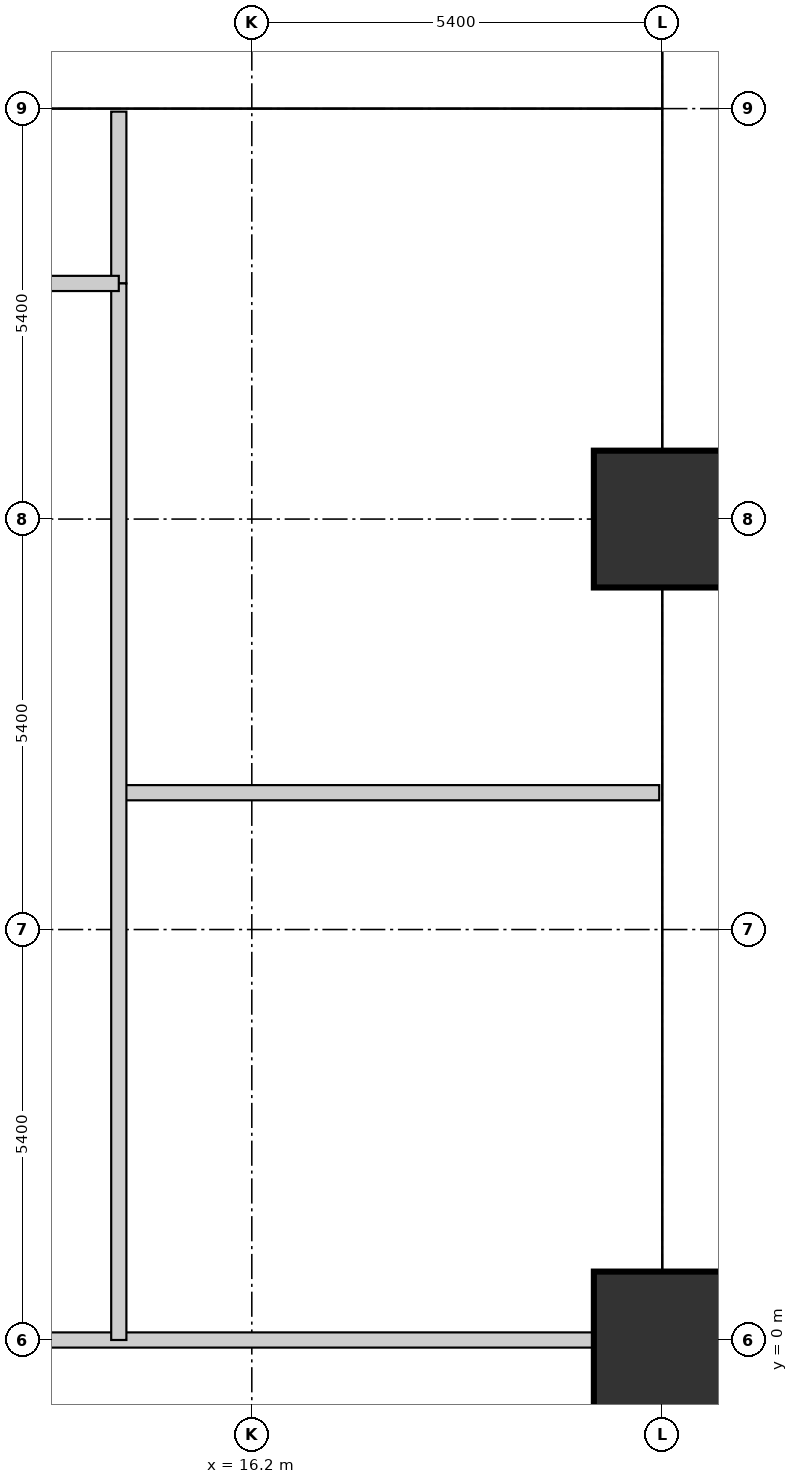
"""IFC4 building model, lengths in metres.
Left out: names, types, materials, properties, quantities, classifications, styles, units other than length and angle.
Written with IfcOpenShell. Run it as: python <this file> out.ifc"""

import sys

from ifc_helpers import new_model, si_unit, direction, frame, frame_2d, origin, origin_2d, place, context, subcontext, project, spatial, rectangle, circle, extrude, element, fill, save


model = new_model("IFC4")
c1 = context("Model", 3, precision=1e-05, world=origin(), true_north=direction((0.0, 1.0)))
c2 = subcontext(c1, "Body", "Model", "MODEL_VIEW")
j1 = project(units=[si_unit("LENGTHUNIT", "METRE"), si_unit("PLANEANGLEUNIT", "RADIAN")], contexts=[c1])
p1 = place(None, origin())
s1 = spatial("IfcSite", under=j1, at=p1, CompositionType="ELEMENT")
p2 = place(p1, origin())
s2 = spatial("IfcBuilding", under=s1, at=p2, CompositionType="ELEMENT")
p3 = place(p2, origin())
s3 = spatial("IfcBuildingStorey", under=s2, at=p3, CompositionType="ELEMENT", Elevation=0.0)
for number, where, z_axis, x_axis in (
    (1, (21.6, 0.0, 0.0), (0.0, 0.0, 1.0), (1.0, 0.0, 0.0)),
    (2, (21.6, 10.8, 0.0), (0.0, 0.0, 1.0), (1.0, 0.0, 0.0)),
):
    element("IfcColumn", number, at=place(p3, frame(where, z_axis=z_axis, x_axis=x_axis)), inside=s3, PredefinedType="COLUMN", context=c2, shape_type="SweptSolid", body=[
        extrude(circle(Radius=0.9, at=origin_2d()), origin(), (0.0, 0.0, 1.0), 4.5),
    ])
p4 = place(p3, frame((14.45, 7.2, 0.0), z_axis=(0.0, 0.0, 1.0), x_axis=(1.0, 0.0, 0.0)))
e3 = element("IfcWall", 3, at=p4, inside=s3, PredefinedType="PARTITIONING", context=c2, shape_type="SweptSolid", body=[
    extrude(rectangle(XDim=7.11, YDim=0.2, at=frame_2d((3.555, 0.0))), origin(), (0.0, 0.0, 1.0), 3.329),
])
p5 = place(p3, frame((10.85, 0.0, 0.0), z_axis=(0.0, 0.0, 1.0), x_axis=(1.0, 0.0, 0.0)))
e4 = element("IfcWall", 4, at=p5, inside=s3, PredefinedType="PARTITIONING", context=c2, shape_type="SweptSolid", body=[
    extrude(rectangle(XDim=10.71, YDim=0.2, at=frame_2d((5.355, 0.0))), origin(), (0.0, 0.0, 1.0), 2.205),
])
p6 = place(p5, frame((2.25, 0.0, 0.0)))
e5 = element("IfcOpeningElement", 5, at=p6, cuts=e4, PredefinedType="OPENING", context=c2, shape_type="SweptSolid", body=[
    extrude(rectangle(XDim=1.1, YDim=2.1, at=frame_2d((0.55, 1.05))), frame((0.0, 0.11, 0.0), z_axis=(0.0, -1.0, 0.0), x_axis=(1.0, 0.0, 0.0)), (0.0, 0.0, 1.0), 0.22),
])
p7 = place(p3, frame((14.45, 13.9, 0.0), z_axis=(0.0, 0.0, 1.0), x_axis=(0.0, 1.0, 0.0)))
e6 = element("IfcWall", 6, at=p7, inside=s3, PredefinedType="PARTITIONING", context=c2, shape_type="SweptSolid", body=[
    extrude(rectangle(XDim=2.26, YDim=0.2, at=frame_2d((1.13, 0.0))), origin(), (0.0, 0.0, 1.0), 4.2),
])
p8 = place(p3, frame((14.45, 0.0, 0.0), z_axis=(0.0, 0.0, 1.0), x_axis=(0.0, 1.0, 0.0)))
e7 = element("IfcWall", 7, at=p8, inside=s3, PredefinedType="PARTITIONING", context=c2, shape_type="SweptSolid", body=[
    extrude(rectangle(XDim=13.9, YDim=0.2, at=frame_2d((6.95, 0.0))), origin(), (0.0, 0.0, 1.0), 3.329),
])
p9 = place(p8, frame((2.5, 0.0, 0.0)))
e8 = element("IfcOpeningElement", 8, at=p9, cuts=e7, PredefinedType="OPENING", context=c2, shape_type="SweptSolid", body=[
    extrude(rectangle(XDim=1.1, YDim=2.1, at=frame_2d((0.55, 1.05))), frame((0.0, 0.11, 0.0), z_axis=(0.0, -1.0, 0.0), x_axis=(1.0, 0.0, 0.0)), (0.0, 0.0, 1.0), 0.22),
])
p10 = place(p8, frame((9.5, 0.0, 0.0)))
e9 = element("IfcOpeningElement", 9, at=p10, cuts=e7, PredefinedType="OPENING", context=c2, shape_type="SweptSolid", body=[
    extrude(rectangle(XDim=1.1, YDim=2.1, at=frame_2d((0.55, 1.05))), frame((0.0, 0.11, 0.0), z_axis=(0.0, -1.0, 0.0), x_axis=(1.0, 0.0, 0.0)), (0.0, 0.0, 1.0), 0.22),
])
p11 = place(p3, frame((-13.15, 13.9, 0.0), z_axis=(0.0, 0.0, 1.0), x_axis=(1.0, 0.0, 0.0)))
e10 = element("IfcWall", 10, at=p11, inside=s3, PredefinedType="PARTITIONING", context=c2, shape_type="SweptSolid", body=[
    extrude(rectangle(XDim=27.6, YDim=0.2, at=frame_2d((13.8, 0.0))), origin(), (0.0, 0.0, 1.0), 3.329),
])
p12 = place(p11, frame((3.2, 0.0, 0.0)))
e11 = element("IfcOpeningElement", 11, at=p12, cuts=e10, PredefinedType="OPENING", context=c2, shape_type="SweptSolid", body=[
    extrude(rectangle(XDim=0.85, YDim=2.1, at=frame_2d((0.425, 1.05))), frame((0.0, 0.11, 0.0), z_axis=(0.0, -1.0, 0.0), x_axis=(1.0, 0.0, 0.0)), (0.0, 0.0, 1.0), 0.22),
])
p13 = place(p11, frame((14.0, 0.0, 0.0)))
e12 = element("IfcOpeningElement", 12, at=p13, cuts=e10, PredefinedType="OPENING", context=c2, shape_type="SweptSolid", body=[
    extrude(rectangle(XDim=1.1, YDim=2.1, at=frame_2d((0.55, 1.05))), frame((0.0, 0.11, 0.0), z_axis=(0.0, -1.0, 0.0), x_axis=(1.0, 0.0, 0.0)), (0.0, 0.0, 1.0), 0.22),
])
p14 = place(p6, origin())
e13 = element("IfcDoor", 13, at=p14, inside=s3, OperationType="SINGLE_SWING_RIGHT", PredefinedType="DOOR", context=c2, shape_type="SweptSolid", body=[
    extrude(rectangle(XDim=1.1, YDim=2.1, at=frame_2d((0.55, 1.05))), frame((0.0, 0.025, 0.0), z_axis=(0.0, -1.0, 0.0), x_axis=(1.0, 0.0, 0.0)), (0.0, 0.0, 1.0), 0.05),
])
fill(e5, e13)
p15 = place(p9, origin())
e14 = element("IfcDoor", 14, at=p15, inside=s3, OperationType="SINGLE_SWING_RIGHT", PredefinedType="DOOR", context=c2, shape_type="SweptSolid", body=[
    extrude(rectangle(XDim=1.1, YDim=2.1, at=frame_2d((0.55, 1.05))), frame((0.0, 0.025, 0.0), z_axis=(0.0, -1.0, 0.0), x_axis=(1.0, 0.0, 0.0)), (0.0, 0.0, 1.0), 0.05),
])
fill(e8, e14)
p16 = place(p10, origin())
e15 = element("IfcDoor", 15, at=p16, inside=s3, OperationType="SINGLE_SWING_LEFT", PredefinedType="DOOR", context=c2, shape_type="SweptSolid", body=[
    extrude(rectangle(XDim=1.1, YDim=2.1, at=frame_2d((0.55, 1.05))), frame((0.0, 0.025, 0.0), z_axis=(0.0, -1.0, 0.0), x_axis=(1.0, 0.0, 0.0)), (0.0, 0.0, 1.0), 0.05),
])
fill(e9, e15)
save(model, sys.argv[1])
